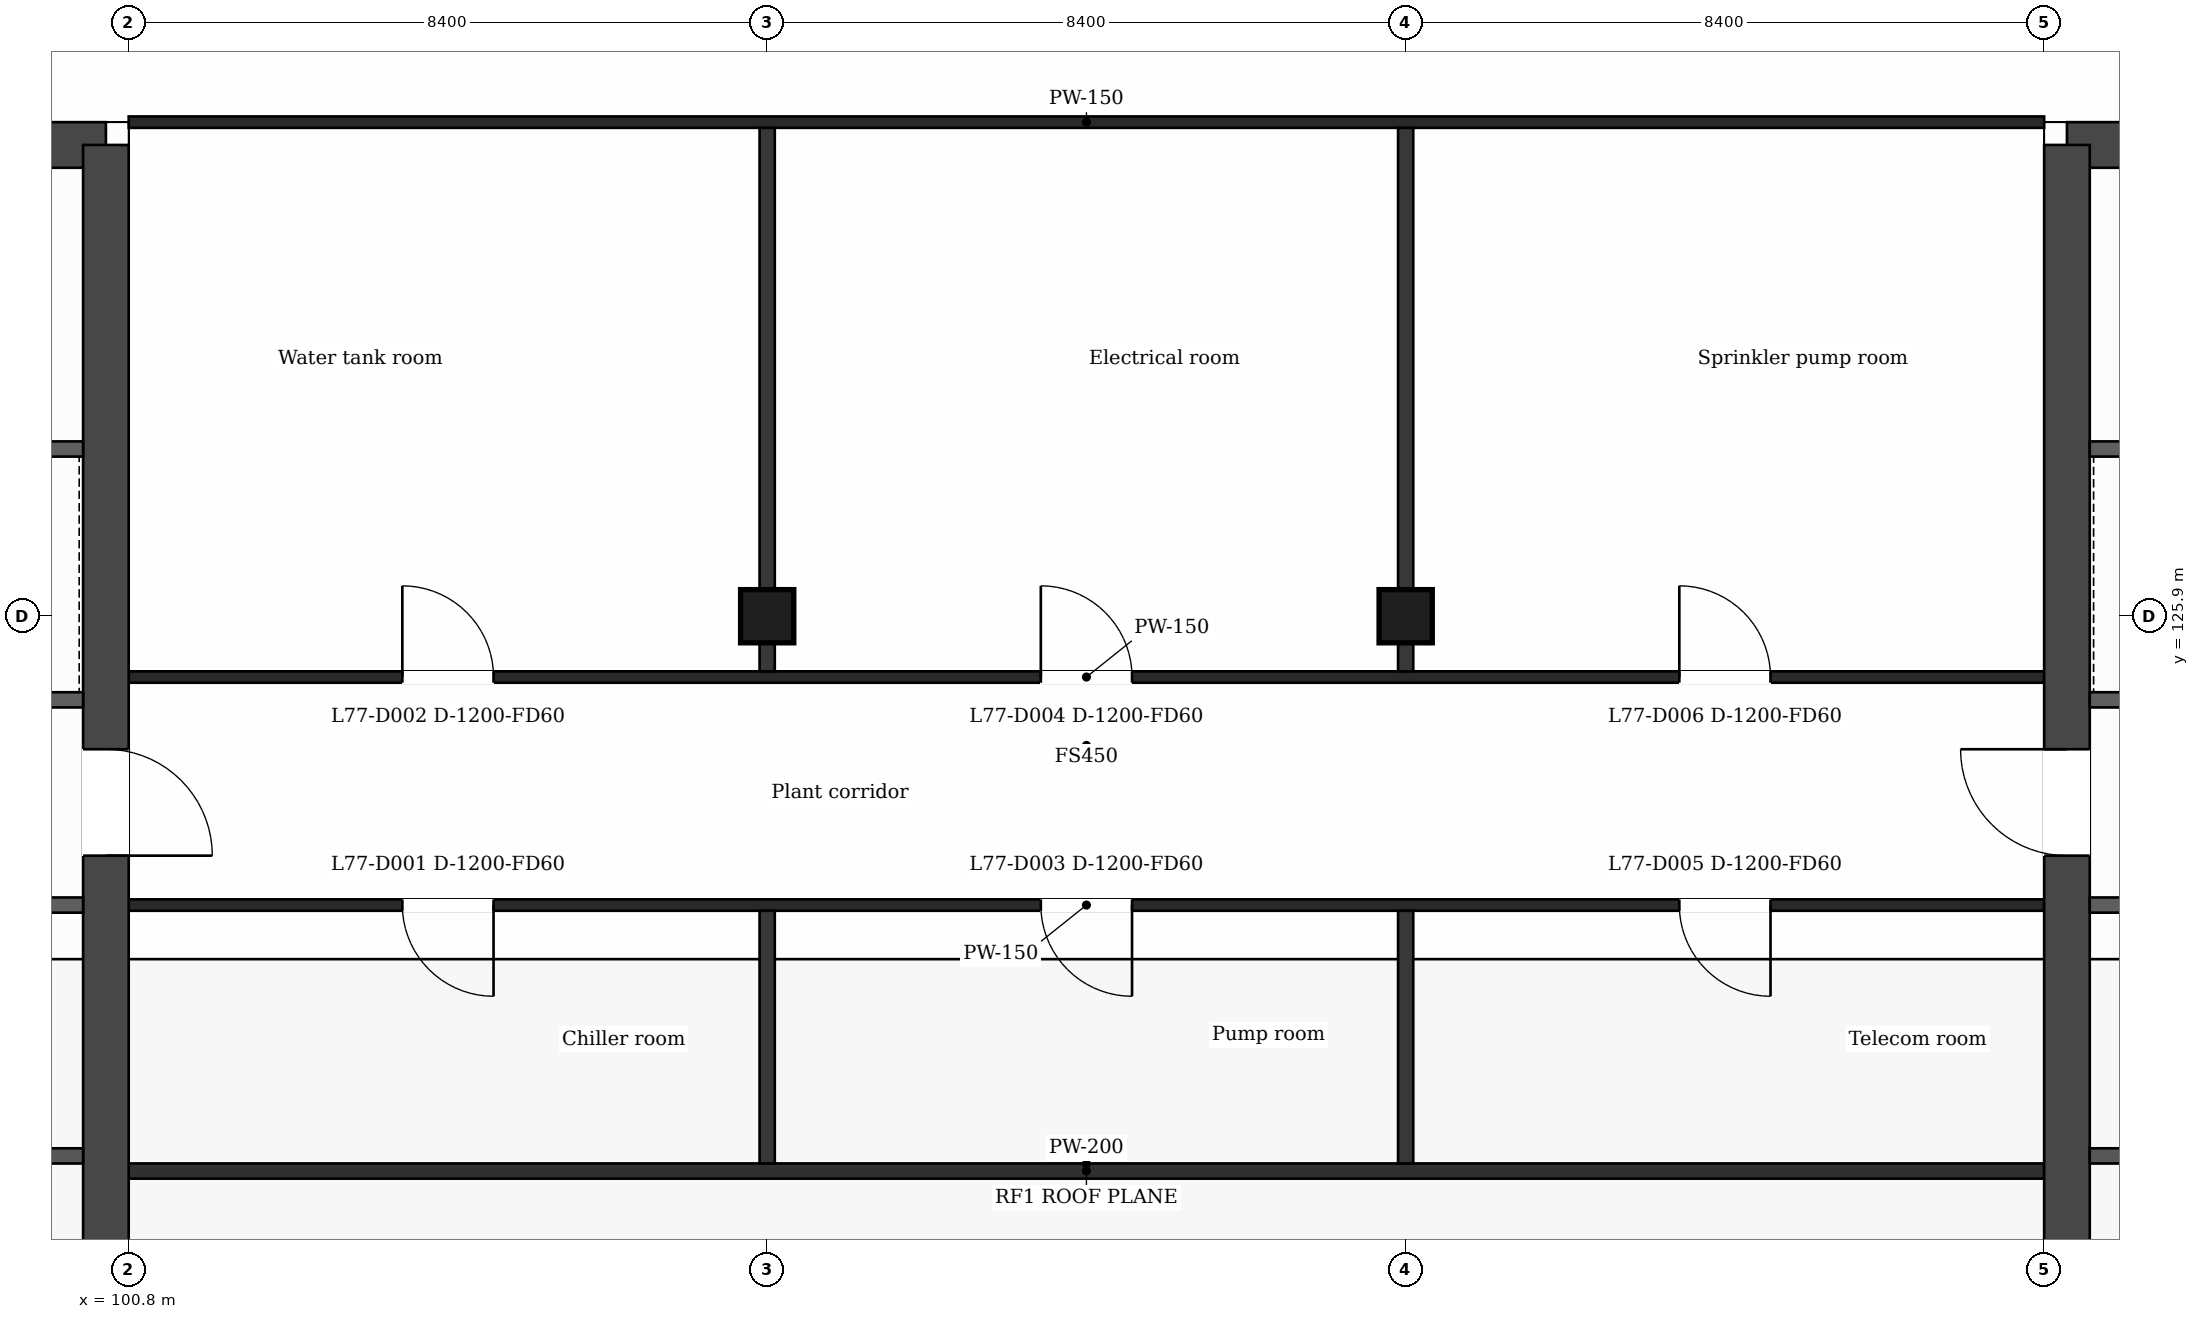
"""IFC4 building model, lengths in metres.
Left out: names, types, materials, properties, quantities, classifications, styles, units other than length and angle.
Written with IfcOpenShell. Run it as: python <this file> out.ifc"""

import sys

from ifc_helpers import new_model, si_unit, direction, frame, frame_2d, origin, origin_2d, place, context, subcontext, project, spatial, polyline, rectangle, outline, extrude, element, fill, save


model = new_model("IFC4")
c1 = context("Model", 3, precision=1e-05, world=origin(), true_north=direction((0.0, 1.0)))
c2 = subcontext(c1, "Body", "Model", "MODEL_VIEW")
j1 = project(units=[si_unit("LENGTHUNIT", "METRE"), si_unit("PLANEANGLEUNIT", "RADIAN")], contexts=[c1])
p1 = place(None, origin())
s1 = spatial("IfcSite", under=j1, at=p1, CompositionType="ELEMENT")
p2 = place(p1, origin())
s2 = spatial("IfcBuilding", under=s1, at=p2, CompositionType="ELEMENT")
p3 = place(p2, frame((0.0, 0.0, 319.9)))
s3 = spatial("IfcBuildingStorey", under=s2, at=p3, CompositionType="ELEMENT", Elevation=319.9)
p4 = place(p3, frame((88.893, 132.1, 0.0), z_axis=(0.0, 0.0, 1.0), x_axis=(1.0, 0.0, 0.0)))
e1 = element("IfcWall", 1, at=p4, inside=s3, PredefinedType="SHEAR", context=c2, shape_type="SweptSolid", body=[
    extrude(outline(polyline([(0.0, 0.0), (11.607, 0.0), (11.607, 9.665), (0.0, 9.665), (0.0, 0.0)])), frame((0.0, 0.3, 0.0), z_axis=(0.0, -1.0, 0.0), x_axis=(1.0, 0.0, 0.0)), (0.0, 0.0, 1.0), 0.6),
])
p5 = place(p4, frame((7.021, 0.0, 0.0)))
e2 = element("IfcOpeningElement", 2, at=p5, cuts=e1, PredefinedType="OPENING", context=c2, shape_type="SweptSolid", body=[
    extrude(rectangle(XDim=1.2, YDim=2.1, at=frame_2d((0.6, 1.05))), frame((0.0, 0.31, 0.0), z_axis=(0.0, -1.0, 0.0), x_axis=(1.0, 0.0, 0.0)), (0.0, 0.0, 1.0), 0.62),
])
p6 = place(p3, frame((100.5, 132.1, 0.0), z_axis=(0.0, 0.0, 1.0), x_axis=(0.0, -1.0, 0.0)))
e3 = element("IfcWall", 3, at=p6, inside=s3, PredefinedType="SHEAR", context=c2, shape_type="SweptSolid", body=[
    extrude(outline(polyline([(0.0, 0.0), (15.8, 0.0), (15.8, 1.162), (9.597, 4.5), (0.0, 9.665), (0.0, 0.0)])), frame((0.0, 0.3, 0.0), z_axis=(0.0, -1.0, 0.0), x_axis=(1.0, 0.0, 0.0)), (0.0, 0.0, 1.0), 0.6),
])
p7 = place(p6, frame((7.95, 0.0, 0.0)))
e4 = element("IfcOpeningElement", 4, at=p7, cuts=e3, PredefinedType="OPENING", context=c2, shape_type="SweptSolid", body=[
    extrude(rectangle(XDim=1.4, YDim=2.1, at=frame_2d((0.7, 1.05))), frame((0.0, 0.31, 0.0), z_axis=(0.0, -1.0, 0.0), x_axis=(1.0, 0.0, 0.0)), (0.0, 0.0, 1.0), 0.62),
])
p8 = place(p3, frame((126.3, 132.1, 0.0), z_axis=(0.0, 0.0, 1.0), x_axis=(1.0, 0.0, 0.0)))
e5 = element("IfcWall", 5, at=p8, inside=s3, PredefinedType="SHEAR", context=c2, shape_type="SweptSolid", body=[
    extrude(outline(polyline([(0.0, 0.0), (11.607, 0.0), (11.607, 9.665), (0.0, 9.665), (0.0, 0.0)])), frame((0.0, 0.3, 0.0), z_axis=(0.0, -1.0, 0.0), x_axis=(1.0, 0.0, 0.0)), (0.0, 0.0, 1.0), 0.6),
])
p9 = place(p8, frame((3.386, 0.0, 0.0)))
e6 = element("IfcOpeningElement", 6, at=p9, cuts=e5, PredefinedType="OPENING", context=c2, shape_type="SweptSolid", body=[
    extrude(rectangle(XDim=1.2, YDim=2.1, at=frame_2d((0.6, 1.05))), frame((0.0, 0.31, 0.0), z_axis=(0.0, -1.0, 0.0), x_axis=(1.0, 0.0, 0.0)), (0.0, 0.0, 1.0), 0.62),
])
p10 = place(p3, frame((126.3, 116.3, 0.0), z_axis=(0.0, 0.0, 1.0), x_axis=(0.0, 1.0, 0.0)))
e7 = element("IfcWall", 7, at=p10, inside=s3, PredefinedType="SHEAR", context=c2, shape_type="SweptSolid", body=[
    extrude(outline(polyline([(0.0, 0.0), (15.8, 0.0), (15.8, 9.665), (6.203, 4.5), (0.0, 1.162), (0.0, 0.0)])), frame((0.0, 0.3, 0.0), z_axis=(0.0, -1.0, 0.0), x_axis=(1.0, 0.0, 0.0)), (0.0, 0.0, 1.0), 0.6),
])
p11 = place(p10, frame((6.45, 0.0, 0.0)))
e8 = element("IfcOpeningElement", 8, at=p11, cuts=e7, PredefinedType="OPENING", context=c2, shape_type="SweptSolid", body=[
    extrude(rectangle(XDim=1.4, YDim=2.1, at=frame_2d((0.7, 1.05))), frame((0.0, 0.31, 0.0), z_axis=(0.0, -1.0, 0.0), x_axis=(1.0, 0.0, 0.0)), (0.0, 0.0, 1.0), 0.62),
])
for number, where, z_axis, x_axis in (
    (9, (109.2, 125.9, 0.0), (0.0, 0.0, 1.0), (1.0, 0.0, 0.0)),
    (10, (117.6, 125.9, 0.0), (0.0, 0.0, 1.0), (1.0, 0.0, 0.0)),
):
    element("IfcColumn", number, at=place(p3, frame(where, z_axis=z_axis, x_axis=x_axis)), inside=s3, PredefinedType="COLUMN", context=c2, shape_type="SweptSolid", body=[
        extrude(rectangle(XDim=0.7, YDim=0.7, at=origin_2d()), origin(), (0.0, 0.0, 1.0), 4.5),
    ])
p12 = place(p3, frame((100.8, 118.601, 0.0), z_axis=(0.0, 0.0, 1.0), x_axis=(1.0, 0.0, 0.0)))
e11 = element("IfcWall", 11, at=p12, inside=s3, PredefinedType="PARTITIONING", context=c2, shape_type="SweptSolid", body=[
    extrude(rectangle(XDim=25.2, YDim=0.2, at=frame_2d((12.6, 0.0))), origin(), (0.0, 0.0, 1.0), 2.35),
])
for number, where, z_axis, x_axis in (
    (12, (95.227, 118.8, 0.0), (0.0, 0.0, 1.0), (1.0, 0.0, 0.0)),
    (13, (126.6, 118.8, 0.0), (0.0, 0.0, 1.0), (1.0, 0.0, 0.0)),
):
    element("IfcWall", number, at=place(p3, frame(where, z_axis=z_axis, x_axis=x_axis)), inside=s3, PredefinedType="PARTITIONING", context=c2, shape_type="SweptSolid", body=[
        extrude(rectangle(XDim=4.973, YDim=0.2, at=frame_2d((2.486, 0.0))), origin(), (0.0, 0.0, 1.0), 2.457),
    ])
for number, where, z_axis, x_axis in (
    (14, (95.227, 122.1, 0.0), (0.0, 0.0, 1.0), (1.0, 0.0, 0.0)),
    (15, (126.6, 122.1, 0.0), (0.0, 0.0, 1.0), (1.0, 0.0, 0.0)),
):
    element("IfcWall", number, at=place(p3, frame(where, z_axis=z_axis, x_axis=x_axis)), inside=s3, PredefinedType="PARTITIONING", context=c2, shape_type="SweptSolid", body=[
        extrude(rectangle(XDim=4.973, YDim=0.2, at=frame_2d((2.486, 0.0))), origin(), (0.0, 0.0, 1.0), 4.05),
    ])
p13 = place(p3, frame((100.8, 122.1, 0.0), z_axis=(0.0, 0.0, 1.0), x_axis=(1.0, 0.0, 0.0)))
e16 = element("IfcWall", 16, at=p13, inside=s3, PredefinedType="PARTITIONING", context=c2, shape_type="SweptSolid", body=[
    extrude(rectangle(XDim=25.2, YDim=0.15, at=frame_2d((12.6, 0.0))), origin(), (0.0, 0.0, 1.0), 4.05),
])
p14 = place(p13, frame((3.6, 0.0, 0.0)))
e17 = element("IfcOpeningElement", 17, at=p14, cuts=e16, PredefinedType="OPENING", context=c2, shape_type="SweptSolid", body=[
    extrude(rectangle(XDim=1.2, YDim=2.1, at=frame_2d((0.6, 1.05))), frame((0.0, 0.085, 0.0), z_axis=(0.0, -1.0, 0.0), x_axis=(1.0, 0.0, 0.0)), (0.0, 0.0, 1.0), 0.17),
])
p15 = place(p13, frame((12.0, 0.0, 0.0)))
e18 = element("IfcOpeningElement", 18, at=p15, cuts=e16, PredefinedType="OPENING", context=c2, shape_type="SweptSolid", body=[
    extrude(rectangle(XDim=1.2, YDim=2.1, at=frame_2d((0.6, 1.05))), frame((0.0, 0.085, 0.0), z_axis=(0.0, -1.0, 0.0), x_axis=(1.0, 0.0, 0.0)), (0.0, 0.0, 1.0), 0.17),
])
p16 = place(p13, frame((20.4, 0.0, 0.0)))
e19 = element("IfcOpeningElement", 19, at=p16, cuts=e16, PredefinedType="OPENING", context=c2, shape_type="SweptSolid", body=[
    extrude(rectangle(XDim=1.2, YDim=2.1, at=frame_2d((0.6, 1.05))), frame((0.0, 0.085, 0.0), z_axis=(0.0, -1.0, 0.0), x_axis=(1.0, 0.0, 0.0)), (0.0, 0.0, 1.0), 0.17),
])
p17 = place(p3, frame((92.702, 124.8, 0.0), z_axis=(0.0, 0.0, 1.0), x_axis=(1.0, 0.0, 0.0)))
e20 = element("IfcWall", 20, at=p17, inside=s3, PredefinedType="PARTITIONING", context=c2, shape_type="SweptSolid", body=[
    extrude(rectangle(XDim=7.498, YDim=0.2, at=frame_2d((3.749, 0.0))), origin(), (0.0, 0.0, 1.0), 4.05),
])
p18 = place(p17, frame((5.884, 0.0, 0.0)))
e21 = element("IfcOpeningElement", 21, at=p18, cuts=e20, PredefinedType="OPENING", context=c2, shape_type="SweptSolid", body=[
    extrude(rectangle(XDim=1.1, YDim=2.1, at=frame_2d((0.55, 1.05))), frame((0.0, 0.11, 0.0), z_axis=(0.0, -1.0, 0.0), x_axis=(1.0, 0.0, 0.0)), (0.0, 0.0, 1.0), 0.22),
])
p19 = place(p3, frame((126.6, 124.8, 0.0), z_axis=(0.0, 0.0, 1.0), x_axis=(1.0, 0.0, 0.0)))
e22 = element("IfcWall", 22, at=p19, inside=s3, PredefinedType="PARTITIONING", context=c2, shape_type="SweptSolid", body=[
    extrude(rectangle(XDim=4.915, YDim=0.2, at=frame_2d((2.458, 0.0))), origin(), (0.0, 0.0, 1.0), 4.05),
])
p20 = place(p19, frame((0.745, 0.0, 0.0)))
e23 = element("IfcOpeningElement", 23, at=p20, cuts=e22, PredefinedType="OPENING", context=c2, shape_type="SweptSolid", body=[
    extrude(rectangle(XDim=1.1, YDim=2.1, at=frame_2d((0.55, 1.05))), frame((0.0, 0.11, 0.0), z_axis=(0.0, -1.0, 0.0), x_axis=(1.0, 0.0, 0.0)), (0.0, 0.0, 1.0), 0.22),
])
p21 = place(p3, frame((100.8, 125.1, 0.0), z_axis=(0.0, 0.0, 1.0), x_axis=(1.0, 0.0, 0.0)))
e24 = element("IfcWall", 24, at=p21, inside=s3, PredefinedType="PARTITIONING", context=c2, shape_type="SweptSolid", body=[
    extrude(rectangle(XDim=25.2, YDim=0.15, at=frame_2d((12.6, 0.0))), origin(), (0.0, 0.0, 1.0), 4.05),
])
p22 = place(p21, frame((3.6, 0.0, 0.0)))
e25 = element("IfcOpeningElement", 25, at=p22, cuts=e24, PredefinedType="OPENING", context=c2, shape_type="SweptSolid", body=[
    extrude(rectangle(XDim=1.2, YDim=2.1, at=frame_2d((0.6, 1.05))), frame((0.0, 0.085, 0.0), z_axis=(0.0, -1.0, 0.0), x_axis=(1.0, 0.0, 0.0)), (0.0, 0.0, 1.0), 0.17),
])
p23 = place(p21, frame((12.0, 0.0, 0.0)))
e26 = element("IfcOpeningElement", 26, at=p23, cuts=e24, PredefinedType="OPENING", context=c2, shape_type="SweptSolid", body=[
    extrude(rectangle(XDim=1.2, YDim=2.1, at=frame_2d((0.6, 1.05))), frame((0.0, 0.085, 0.0), z_axis=(0.0, -1.0, 0.0), x_axis=(1.0, 0.0, 0.0)), (0.0, 0.0, 1.0), 0.17),
])
p24 = place(p21, frame((20.4, 0.0, 0.0)))
e27 = element("IfcOpeningElement", 27, at=p24, cuts=e24, PredefinedType="OPENING", context=c2, shape_type="SweptSolid", body=[
    extrude(rectangle(XDim=1.2, YDim=2.1, at=frame_2d((0.6, 1.05))), frame((0.0, 0.085, 0.0), z_axis=(0.0, -1.0, 0.0), x_axis=(1.0, 0.0, 0.0)), (0.0, 0.0, 1.0), 0.17),
])
p25 = place(p3, frame((92.827, 128.1, 0.0), z_axis=(0.0, 0.0, 1.0), x_axis=(1.0, 0.0, 0.0)))
e28 = element("IfcWall", 28, at=p25, inside=s3, PredefinedType="PARTITIONING", context=c2, shape_type="SweptSolid", body=[
    extrude(rectangle(XDim=7.373, YDim=0.2, at=frame_2d((3.687, 0.0))), origin(), (0.0, 0.0, 1.0), 4.05),
])
p26 = place(p25, frame((3.137, 0.0, 0.0)))
e29 = element("IfcOpeningElement", 29, at=p26, cuts=e28, PredefinedType="OPENING", context=c2, shape_type="SweptSolid", body=[
    extrude(rectangle(XDim=1.1, YDim=2.1, at=frame_2d((0.55, 1.05))), frame((0.0, 0.11, 0.0), z_axis=(0.0, -1.0, 0.0), x_axis=(1.0, 0.0, 0.0)), (0.0, 0.0, 1.0), 0.22),
])
p27 = place(p3, frame((126.6, 128.1, 0.0), z_axis=(0.0, 0.0, 1.0), x_axis=(1.0, 0.0, 0.0)))
e30 = element("IfcWall", 30, at=p27, inside=s3, PredefinedType="PARTITIONING", context=c2, shape_type="SweptSolid", body=[
    extrude(rectangle(XDim=4.915, YDim=0.2, at=frame_2d((2.458, 0.0))), origin(), (0.0, 0.0, 1.0), 4.05),
])
p28 = place(p27, frame((3.071, 0.0, 0.0)))
e31 = element("IfcOpeningElement", 31, at=p28, cuts=e30, PredefinedType="OPENING", context=c2, shape_type="SweptSolid", body=[
    extrude(rectangle(XDim=1.1, YDim=2.1, at=frame_2d((0.55, 1.05))), frame((0.0, 0.11, 0.0), z_axis=(0.0, -1.0, 0.0), x_axis=(1.0, 0.0, 0.0)), (0.0, 0.0, 1.0), 0.22),
])
p29 = place(p3, frame((100.8, 132.4, 0.0), z_axis=(0.0, 0.0, 1.0), x_axis=(1.0, 0.0, 0.0)))
e32 = element("IfcWall", 32, at=p29, inside=s3, PredefinedType="PARTITIONING", context=c2, shape_type="SweptSolid", body=[
    extrude(rectangle(XDim=25.2, YDim=0.15, at=frame_2d((12.6, 0.0))), origin(), (0.0, 0.0, 1.0), 4.05),
])
p30 = place(p3, frame((109.2, 118.701, 0.0), z_axis=(0.0, 0.0, 1.0), x_axis=(0.0, 1.0, 0.0)))
e33 = element("IfcWall", 33, at=p30, inside=s3, PredefinedType="PARTITIONING", context=c2, shape_type="SweptSolid", body=[
    extrude(outline(polyline([(0.0, 0.0), (3.324, 0.0), (3.324, 4.05), (3.059, 4.05), (0.0, 2.404), (0.0, 0.0)])), frame((0.0, 0.1, 0.0), z_axis=(0.0, -1.0, 0.0), x_axis=(1.0, 0.0, 0.0)), (0.0, 0.0, 1.0), 0.2),
])
p31 = place(p3, frame((109.2, 125.175, 0.0), z_axis=(0.0, 0.0, 1.0), x_axis=(0.0, 1.0, 0.0)))
e34 = element("IfcWall", 34, at=p31, inside=s3, PredefinedType="PARTITIONING", context=c2, shape_type="SweptSolid", body=[
    extrude(rectangle(XDim=7.15, YDim=0.2, at=frame_2d((3.575, 0.0))), origin(), (0.0, 0.0, 1.0), 4.05),
])
p32 = place(p3, frame((117.6, 118.701, 0.0), z_axis=(0.0, 0.0, 1.0), x_axis=(0.0, 1.0, 0.0)))
e35 = element("IfcWall", 35, at=p32, inside=s3, PredefinedType="PARTITIONING", context=c2, shape_type="SweptSolid", body=[
    extrude(outline(polyline([(0.0, 0.0), (3.324, 0.0), (3.324, 4.05), (3.059, 4.05), (0.0, 2.404), (0.0, 0.0)])), frame((0.0, 0.1, 0.0), z_axis=(0.0, -1.0, 0.0), x_axis=(1.0, 0.0, 0.0)), (0.0, 0.0, 1.0), 0.2),
])
p33 = place(p3, frame((117.6, 125.175, 0.0), z_axis=(0.0, 0.0, 1.0), x_axis=(0.0, 1.0, 0.0)))
e36 = element("IfcWall", 36, at=p33, inside=s3, PredefinedType="PARTITIONING", context=c2, shape_type="SweptSolid", body=[
    extrude(rectangle(XDim=7.15, YDim=0.2, at=frame_2d((3.575, 0.0))), origin(), (0.0, 0.0, 1.0), 4.05),
])
p34 = place(p14, origin())
e37 = element("IfcDoor", 37, at=p34, inside=s3, OperationType="SINGLE_SWING_RIGHT", PredefinedType="DOOR", context=c2, shape_type="SweptSolid", body=[
    extrude(rectangle(XDim=1.2, YDim=2.1, at=frame_2d((0.6, 1.05))), frame((0.0, 0.025, 0.0), z_axis=(0.0, -1.0, 0.0), x_axis=(1.0, 0.0, 0.0)), (0.0, 0.0, 1.0), 0.05),
])
fill(e17, e37)
p35 = place(p22, origin())
e38 = element("IfcDoor", 38, at=p35, inside=s3, OperationType="SINGLE_SWING_LEFT", PredefinedType="DOOR", context=c2, shape_type="SweptSolid", body=[
    extrude(rectangle(XDim=1.2, YDim=2.1, at=frame_2d((0.6, 1.05))), frame((0.0, 0.025, 0.0), z_axis=(0.0, -1.0, 0.0), x_axis=(1.0, 0.0, 0.0)), (0.0, 0.0, 1.0), 0.05),
])
fill(e25, e38)
p36 = place(p15, origin())
e39 = element("IfcDoor", 39, at=p36, inside=s3, OperationType="SINGLE_SWING_RIGHT", PredefinedType="DOOR", context=c2, shape_type="SweptSolid", body=[
    extrude(rectangle(XDim=1.2, YDim=2.1, at=frame_2d((0.6, 1.05))), frame((0.0, 0.025, 0.0), z_axis=(0.0, -1.0, 0.0), x_axis=(1.0, 0.0, 0.0)), (0.0, 0.0, 1.0), 0.05),
])
fill(e18, e39)
p37 = place(p23, origin())
e40 = element("IfcDoor", 40, at=p37, inside=s3, OperationType="SINGLE_SWING_LEFT", PredefinedType="DOOR", context=c2, shape_type="SweptSolid", body=[
    extrude(rectangle(XDim=1.2, YDim=2.1, at=frame_2d((0.6, 1.05))), frame((0.0, 0.025, 0.0), z_axis=(0.0, -1.0, 0.0), x_axis=(1.0, 0.0, 0.0)), (0.0, 0.0, 1.0), 0.05),
])
fill(e26, e40)
p38 = place(p16, origin())
e41 = element("IfcDoor", 41, at=p38, inside=s3, OperationType="SINGLE_SWING_RIGHT", PredefinedType="DOOR", context=c2, shape_type="SweptSolid", body=[
    extrude(rectangle(XDim=1.2, YDim=2.1, at=frame_2d((0.6, 1.05))), frame((0.0, 0.025, 0.0), z_axis=(0.0, -1.0, 0.0), x_axis=(1.0, 0.0, 0.0)), (0.0, 0.0, 1.0), 0.05),
])
fill(e19, e41)
p39 = place(p24, origin())
e42 = element("IfcDoor", 42, at=p39, inside=s3, OperationType="SINGLE_SWING_LEFT", PredefinedType="DOOR", context=c2, shape_type="SweptSolid", body=[
    extrude(rectangle(XDim=1.2, YDim=2.1, at=frame_2d((0.6, 1.05))), frame((0.0, 0.025, 0.0), z_axis=(0.0, -1.0, 0.0), x_axis=(1.0, 0.0, 0.0)), (0.0, 0.0, 1.0), 0.05),
])
fill(e27, e42)
p40 = place(p7, origin())
e43 = element("IfcDoor", 43, at=p40, inside=s3, OperationType="SINGLE_SWING_RIGHT", PredefinedType="DOOR", context=c2, shape_type="SweptSolid", body=[
    extrude(rectangle(XDim=1.4, YDim=2.1, at=frame_2d((0.7, 1.05))), frame((0.0, 0.025, 0.0), z_axis=(0.0, -1.0, 0.0), x_axis=(1.0, 0.0, 0.0)), (0.0, 0.0, 1.0), 0.05),
])
fill(e4, e43)
p41 = place(p11, origin())
e44 = element("IfcDoor", 44, at=p41, inside=s3, OperationType="SINGLE_SWING_RIGHT", PredefinedType="DOOR", context=c2, shape_type="SweptSolid", body=[
    extrude(rectangle(XDim=1.4, YDim=2.1, at=frame_2d((0.7, 1.05))), frame((0.0, 0.025, 0.0), z_axis=(0.0, -1.0, 0.0), x_axis=(1.0, 0.0, 0.0)), (0.0, 0.0, 1.0), 0.05),
])
fill(e8, e44)
save(model, sys.argv[1])
